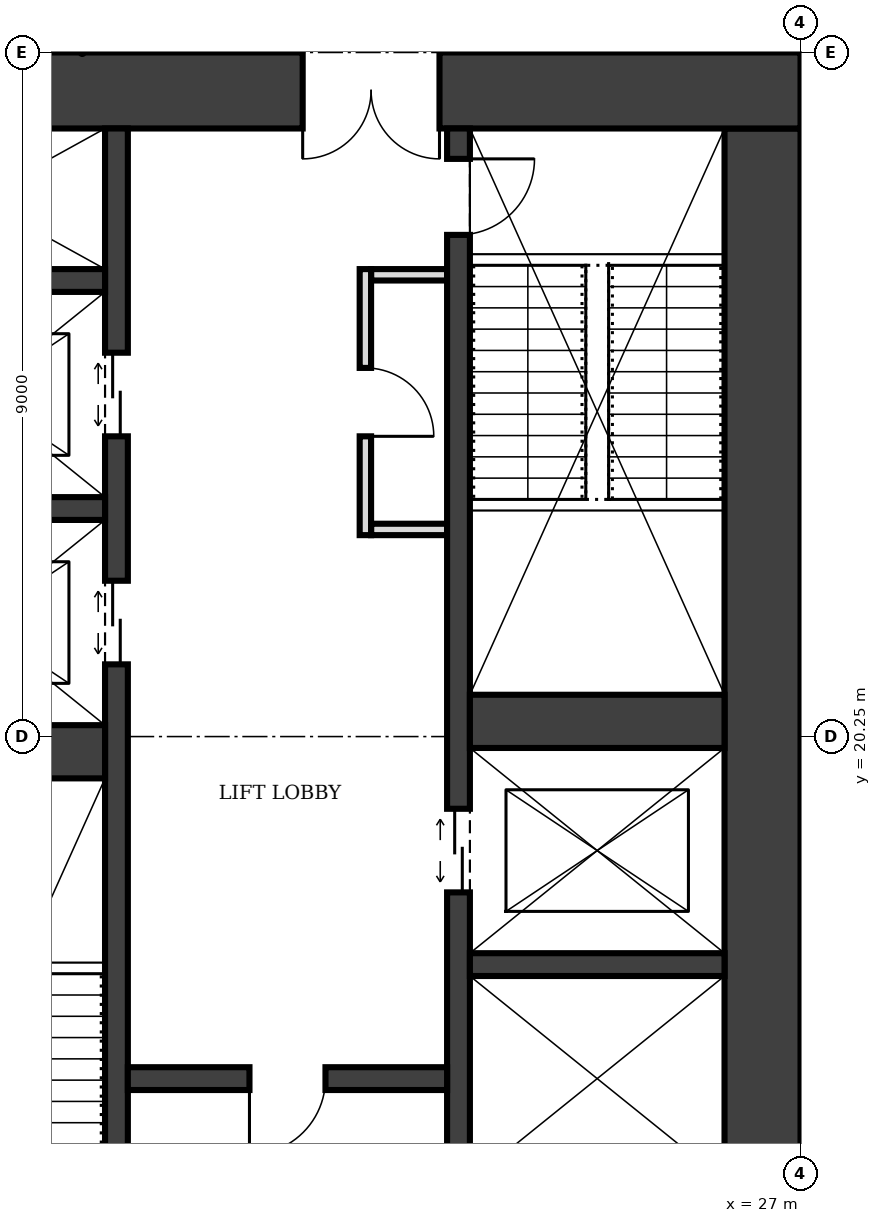
"""IFC4 building model, lengths in metres.
Left out: names, types, materials, properties, quantities, classifications, styles, units other than length and angle.
Written with IfcOpenShell. Run it as: python <this file> out.ifc"""

import sys

from ifc_helpers import new_model, si_unit, direction, frame, frame_2d, origin, place, context, subcontext, project, spatial, rectangle, extrude, element, fill, save


model = new_model("IFC4")
c1 = context("Model", 3, precision=1e-05, world=origin(), true_north=direction((0.0, 1.0)))
c2 = subcontext(c1, "Body", "Model", "MODEL_VIEW")
j1 = project(units=[si_unit("LENGTHUNIT", "METRE"), si_unit("PLANEANGLEUNIT", "RADIAN")], contexts=[c1])
p1 = place(None, origin())
s1 = spatial("IfcSite", under=j1, at=p1, CompositionType="ELEMENT")
p2 = place(p1, origin())
s2 = spatial("IfcBuilding", under=s1, at=p2, CompositionType="ELEMENT")
p3 = place(p2, frame((0.0, 0.0, 33.0)))
s3 = spatial("IfcBuildingStorey", under=s2, at=p3, CompositionType="ELEMENT", Elevation=33.0)
p4 = place(p3, frame((26.5, 12.25, 0.0), z_axis=(0.0, 0.0, 1.0), x_axis=(0.0, 1.0, 0.0)))
e1 = element("IfcWall", 1, at=p4, inside=s3, PredefinedType="SHEAR", context=c2, shape_type="SweptSolid", body=[
    extrude(rectangle(XDim=16.0, YDim=1.0, at=frame_2d((8.0, 0.0))), origin(), (0.0, 0.0, 1.0), 4.0),
])
p5 = place(p3, frame((27.0, 28.75, 0.0), z_axis=(0.0, 0.0, 1.0), x_axis=(-1.0, 0.0, 0.0)))
e2 = element("IfcWall", 2, at=p5, inside=s3, PredefinedType="SHEAR", context=c2, shape_type="SweptSolid", body=[
    extrude(rectangle(XDim=13.5, YDim=1.0, at=frame_2d((6.75, 0.0))), origin(), (0.0, 0.0, 1.0), 4.0),
])
p6 = place(p5, frame((4.75, 0.0, 0.0)))
e3 = element("IfcOpeningElement", 3, at=p6, cuts=e2, PredefinedType="OPENING", context=c2, shape_type="SweptSolid", body=[
    extrude(rectangle(XDim=1.8, YDim=2.1, at=frame_2d((0.9, 1.05))), frame((0.0, 0.51, 0.0), z_axis=(0.0, -1.0, 0.0), x_axis=(1.0, 0.0, 0.0)), (0.0, 0.0, 1.0), 1.02),
])
p7 = place(p3, frame((18.0, 12.25, 0.0), z_axis=(0.0, 0.0, 1.0), x_axis=(0.0, 1.0, 0.0)))
e4 = element("IfcWall", 4, at=p7, inside=s3, PredefinedType="SHEAR", context=c2, shape_type="SweptSolid", body=[
    extrude(rectangle(XDim=16.0, YDim=0.3, at=frame_2d((8.0, 0.0))), origin(), (0.0, 0.0, 1.0), 4.0),
])
p8 = place(p7, frame((0.4, 0.0, 0.0)))
e5 = element("IfcOpeningElement", 5, at=p8, cuts=e4, PredefinedType="OPENING", context=c2, shape_type="SweptSolid", body=[
    extrude(rectangle(XDim=1.0, YDim=2.1, at=frame_2d((0.5, 1.05))), frame((0.0, 0.16, 0.0), z_axis=(0.0, -1.0, 0.0), x_axis=(1.0, 0.0, 0.0)), (0.0, 0.0, 1.0), 0.32),
])
p9 = place(p7, frame((8.95, 0.0, 0.0)))
e6 = element("IfcOpeningElement", 6, at=p9, cuts=e4, PredefinedType="OPENING", context=c2, shape_type="SweptSolid", body=[
    extrude(rectangle(XDim=1.1, YDim=2.1, at=frame_2d((0.55, 1.05))), frame((0.0, 0.16, 0.0), z_axis=(0.0, -1.0, 0.0), x_axis=(1.0, 0.0, 0.0)), (0.0, 0.0, 1.0), 0.32),
])
p10 = place(p7, frame((11.95, 0.0, 0.0)))
e7 = element("IfcOpeningElement", 7, at=p10, cuts=e4, PredefinedType="OPENING", context=c2, shape_type="SweptSolid", body=[
    extrude(rectangle(XDim=1.1, YDim=2.1, at=frame_2d((0.55, 1.05))), frame((0.0, 0.16, 0.0), z_axis=(0.0, -1.0, 0.0), x_axis=(1.0, 0.0, 0.0)), (0.0, 0.0, 1.0), 0.32),
])
p11 = place(p3, frame((22.5, 12.25, 0.0), z_axis=(0.0, 0.0, 1.0), x_axis=(0.0, 1.0, 0.0)))
e8 = element("IfcWall", 8, at=p11, inside=s3, PredefinedType="SHEAR", context=c2, shape_type="SweptSolid", body=[
    extrude(rectangle(XDim=16.0, YDim=0.3, at=frame_2d((8.0, 0.0))), origin(), (0.0, 0.0, 1.0), 4.0),
])
p12 = place(p11, frame((14.6, 0.0, 0.0)))
e9 = element("IfcOpeningElement", 9, at=p12, cuts=e8, PredefinedType="OPENING", context=c2, shape_type="SweptSolid", body=[
    extrude(rectangle(XDim=1.0, YDim=2.1, at=frame_2d((0.5, 1.05))), frame((0.0, 0.16, 0.0), z_axis=(0.0, -1.0, 0.0), x_axis=(1.0, 0.0, 0.0)), (0.0, 0.0, 1.0), 0.32),
])
p13 = place(p11, frame((0.375, 0.0, 0.0)))
e10 = element("IfcOpeningElement", 10, at=p13, cuts=e8, PredefinedType="OPENING", context=c2, shape_type="SweptSolid", body=[
    extrude(rectangle(XDim=1.1, YDim=2.1, at=frame_2d((0.55, 1.05))), frame((0.0, 0.16, 0.0), z_axis=(0.0, -1.0, 0.0), x_axis=(1.0, 0.0, 0.0)), (0.0, 0.0, 1.0), 0.32),
])
p14 = place(p11, frame((5.95, 0.0, 0.0)))
e11 = element("IfcOpeningElement", 11, at=p14, cuts=e8, PredefinedType="OPENING", context=c2, shape_type="SweptSolid", body=[
    extrude(rectangle(XDim=1.1, YDim=2.1, at=frame_2d((0.55, 1.05))), frame((0.0, 0.16, 0.0), z_axis=(0.0, -1.0, 0.0), x_axis=(1.0, 0.0, 0.0)), (0.0, 0.0, 1.0), 0.32),
])
p15 = place(p3, frame((14.5, 20.05, 0.0), z_axis=(0.0, 0.0, 1.0), x_axis=(1.0, 0.0, 0.0)))
e12 = element("IfcWall", 12, at=p15, inside=s3, PredefinedType="SHEAR", context=c2, shape_type="SweptSolid", body=[
    extrude(rectangle(XDim=3.35, YDim=0.7, at=frame_2d((1.675, 0.0))), origin(), (0.0, 0.0, 1.0), 4.0),
])
p16 = place(p3, frame((18.15, 15.75, 0.0), z_axis=(0.0, 0.0, 1.0), x_axis=(1.0, 0.0, 0.0)))
e13 = element("IfcWall", 13, at=p16, inside=s3, PredefinedType="SHEAR", context=c2, shape_type="SweptSolid", body=[
    extrude(rectangle(XDim=4.2, YDim=0.3, at=frame_2d((2.1, 0.0))), origin(), (0.0, 0.0, 1.0), 4.0),
])
p17 = place(p16, frame((1.6, 0.0, 0.0)))
e14 = element("IfcOpeningElement", 14, at=p17, cuts=e13, PredefinedType="OPENING", context=c2, shape_type="SweptSolid", body=[
    extrude(rectangle(XDim=1.0, YDim=2.1, at=frame_2d((0.5, 1.05))), frame((0.0, 0.16, 0.0), z_axis=(0.0, -1.0, 0.0), x_axis=(1.0, 0.0, 0.0)), (0.0, 0.0, 1.0), 0.32),
])
p18 = place(p3, frame((22.65, 17.25, 0.0), z_axis=(0.0, 0.0, 1.0), x_axis=(1.0, 0.0, 0.0)))
e15 = element("IfcWall", 15, at=p18, inside=s3, PredefinedType="SHEAR", context=c2, shape_type="SweptSolid", body=[
    extrude(rectangle(XDim=3.35, YDim=0.3, at=frame_2d((1.675, 0.0))), origin(), (0.0, 0.0, 1.0), 4.0),
])
p19 = place(p3, frame((22.65, 20.45, 0.0), z_axis=(0.0, 0.0, 1.0), x_axis=(1.0, 0.0, 0.0)))
e16 = element("IfcWall", 16, at=p19, inside=s3, PredefinedType="SHEAR", context=c2, shape_type="SweptSolid", body=[
    extrude(rectangle(XDim=3.35, YDim=0.7, at=frame_2d((1.675, 0.0))), origin(), (0.0, 0.0, 1.0), 4.0),
])
for number, where, z_axis, x_axis in (
    (17, (14.5, 23.25, 0.0), (0.0, 0.0, 1.0), (1.0, 0.0, 0.0)),
    (18, (14.5, 26.25, 0.0), (0.0, 0.0, 1.0), (1.0, 0.0, 0.0)),
):
    element("IfcWall", number, at=place(p3, frame(where, z_axis=z_axis, x_axis=x_axis)), inside=s3, PredefinedType="SHEAR", context=c2, shape_type="SweptSolid", body=[
        extrude(rectangle(XDim=3.35, YDim=0.3, at=frame_2d((1.675, 0.0))), origin(), (0.0, 0.0, 1.0), 4.0),
    ])
p20 = place(p3, frame((21.275, 22.9, 0.0), z_axis=(0.0, 0.0, 1.0), x_axis=(0.0, 1.0, 0.0)))
e19 = element("IfcWall", 19, at=p20, inside=s3, PredefinedType="PARTITIONING", context=c2, shape_type="SweptSolid", body=[
    extrude(rectangle(XDim=3.5, YDim=0.15, at=frame_2d((1.75, 0.0))), origin(), (0.0, 0.0, 1.0), 3.75),
])
p21 = place(p20, frame((1.3, 0.0, 0.0)))
e20 = element("IfcOpeningElement", 20, at=p21, cuts=e19, PredefinedType="OPENING", context=c2, shape_type="SweptSolid", body=[
    extrude(rectangle(XDim=0.9, YDim=2.1, at=frame_2d((0.45, 1.05))), frame((0.0, 0.085, 0.0), z_axis=(0.0, -1.0, 0.0), x_axis=(1.0, 0.0, 0.0)), (0.0, 0.0, 1.0), 0.17),
])
for number, where, z_axis, x_axis in (
    (21, (21.35, 22.975, 0.0), (0.0, 0.0, 1.0), (1.0, 0.0, 0.0)),
    (22, (21.35, 26.325, 0.0), (0.0, 0.0, 1.0), (1.0, 0.0, 0.0)),
):
    element("IfcWall", number, at=place(p3, frame(where, z_axis=z_axis, x_axis=x_axis)), inside=s3, PredefinedType="PARTITIONING", context=c2, shape_type="SweptSolid", body=[
        extrude(rectangle(XDim=1.0, YDim=0.15, at=frame_2d((0.5, 0.0))), origin(), (0.0, 0.0, 1.0), 3.75),
    ])
p22 = place(p6, origin())
e23 = element("IfcDoor", 23, at=p22, inside=s3, OperationType="DOUBLE_DOOR_SINGLE_SWING", PredefinedType="DOOR", context=c2, shape_type="SweptSolid", body=[
    extrude(rectangle(XDim=1.8, YDim=2.1, at=frame_2d((0.9, 1.05))), frame((0.0, 0.025, 0.0), z_axis=(0.0, -1.0, 0.0), x_axis=(1.0, 0.0, 0.0)), (0.0, 0.0, 1.0), 0.05),
])
fill(e3, e23)
p23 = place(p17, frame((1.0, 0.0, 0.0), z_axis=(0.0, 0.0, 1.0), x_axis=(-1.0, 0.0, 0.0)))
e24 = element("IfcDoor", 24, at=p23, inside=s3, OperationType="SINGLE_SWING_RIGHT", PredefinedType="DOOR", context=c2, shape_type="SweptSolid", body=[
    extrude(rectangle(XDim=1.0, YDim=2.1, at=frame_2d((0.5, 1.05))), frame((0.0, 0.025, 0.0), z_axis=(0.0, -1.0, 0.0), x_axis=(1.0, 0.0, 0.0)), (0.0, 0.0, 1.0), 0.05),
])
fill(e14, e24)
p24 = place(p12, frame((1.0, 0.0, 0.0), z_axis=(0.0, 0.0, 1.0), x_axis=(-1.0, 0.0, 0.0)))
e25 = element("IfcDoor", 25, at=p24, inside=s3, OperationType="SINGLE_SWING_LEFT", PredefinedType="DOOR", context=c2, shape_type="SweptSolid", body=[
    extrude(rectangle(XDim=1.0, YDim=2.1, at=frame_2d((0.5, 1.05))), frame((0.0, 0.025, 0.0), z_axis=(0.0, -1.0, 0.0), x_axis=(1.0, 0.0, 0.0)), (0.0, 0.0, 1.0), 0.05),
])
fill(e9, e25)
p25 = place(p9, origin())
e26 = element("IfcDoor", 26, at=p25, inside=s3, OperationType="DOUBLE_DOOR_SLIDING", PredefinedType="DOOR", context=c2, shape_type="SweptSolid", body=[
    extrude(rectangle(XDim=1.1, YDim=2.1, at=frame_2d((0.55, 1.05))), frame((0.0, 0.025, 0.0), z_axis=(0.0, -1.0, 0.0), x_axis=(1.0, 0.0, 0.0)), (0.0, 0.0, 1.0), 0.05),
])
fill(e6, e26)
p26 = place(p10, origin())
e27 = element("IfcDoor", 27, at=p26, inside=s3, OperationType="DOUBLE_DOOR_SLIDING", PredefinedType="DOOR", context=c2, shape_type="SweptSolid", body=[
    extrude(rectangle(XDim=1.1, YDim=2.1, at=frame_2d((0.55, 1.05))), frame((0.0, 0.025, 0.0), z_axis=(0.0, -1.0, 0.0), x_axis=(1.0, 0.0, 0.0)), (0.0, 0.0, 1.0), 0.05),
])
fill(e7, e27)
p27 = place(p14, origin())
e28 = element("IfcDoor", 28, at=p27, inside=s3, OperationType="DOUBLE_DOOR_SLIDING", PredefinedType="DOOR", context=c2, shape_type="SweptSolid", body=[
    extrude(rectangle(XDim=1.1, YDim=2.1, at=frame_2d((0.55, 1.05))), frame((0.0, 0.025, 0.0), z_axis=(0.0, -1.0, 0.0), x_axis=(1.0, 0.0, 0.0)), (0.0, 0.0, 1.0), 0.05),
])
fill(e11, e28)
p28 = place(p21, frame((0.9, 0.0, 0.0), z_axis=(0.0, 0.0, 1.0), x_axis=(-1.0, 0.0, 0.0)))
e29 = element("IfcDoor", 29, at=p28, inside=s3, OperationType="SINGLE_SWING_RIGHT", PredefinedType="DOOR", context=c2, shape_type="SweptSolid", body=[
    extrude(rectangle(XDim=0.9, YDim=2.1, at=frame_2d((0.45, 1.05))), frame((0.0, 0.025, 0.0), z_axis=(0.0, -1.0, 0.0), x_axis=(1.0, 0.0, 0.0)), (0.0, 0.0, 1.0), 0.05),
])
fill(e20, e29)
save(model, sys.argv[1])
